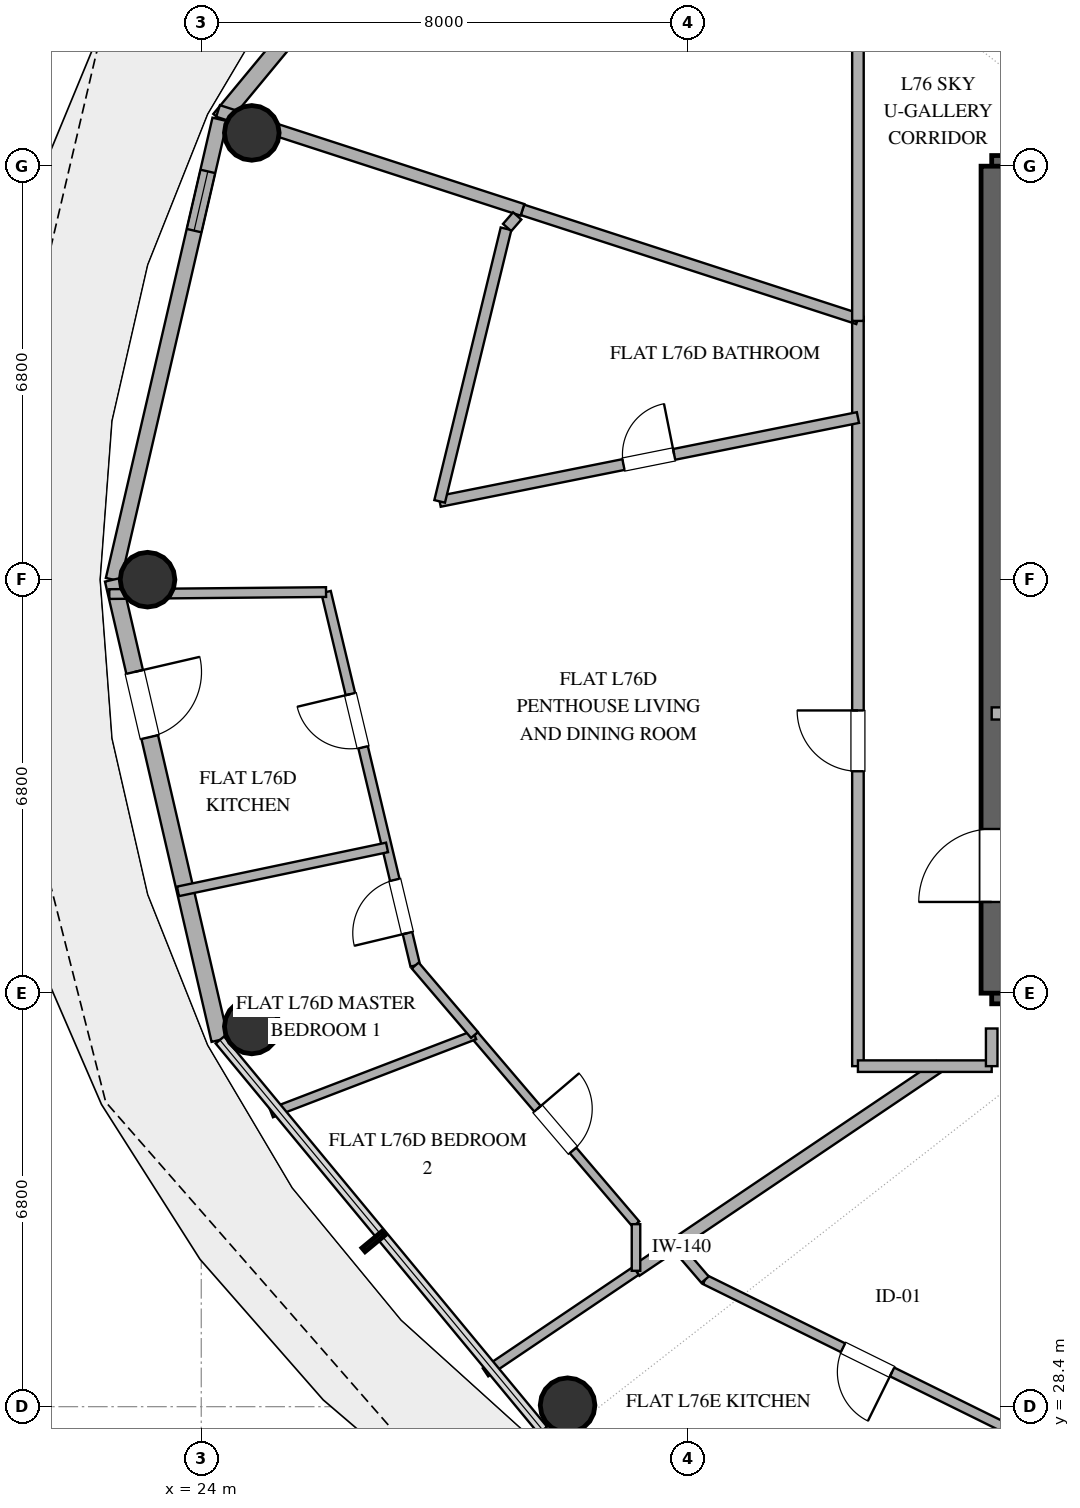
"""IFC4 building model, lengths in metres.
Left out: names, types, materials, properties, quantities, classifications, styles, units other than length and angle.
Written with IfcOpenShell. Run it as: python <this file> out.ifc"""

import sys

from ifc_helpers import new_model, si_unit, direction, frame, frame_2d, origin, origin_2d, place, context, subcontext, project, spatial, rectangle, hollow_circle, extrude, element, fill, save


model = new_model("IFC4")
c1 = context("Model", 3, precision=1e-05, world=origin(), true_north=direction((0.0, 1.0)))
c2 = subcontext(c1, "Body", "Model", "MODEL_VIEW")
j1 = project(units=[si_unit("LENGTHUNIT", "METRE"), si_unit("PLANEANGLEUNIT", "RADIAN")], contexts=[c1])
p1 = place(None, origin())
s1 = spatial("IfcSite", under=j1, at=p1, CompositionType="ELEMENT")
p2 = place(p1, origin())
s2 = spatial("IfcBuilding", under=s1, at=p2, CompositionType="ELEMENT")
p3 = place(p2, frame((0.0, 0.0, 294.6)))
s3 = spatial("IfcBuildingStorey", under=s2, at=p3, CompositionType="ELEMENT", Elevation=294.6)
for number, where, z_axis, x_axis in (
    (1, (37.0, 35.2, 0.0), (0.0, 0.0, 1.0), (1.0, 0.0, 0.0)),
    (2, (37.0, 48.8, 0.0), (0.0, 0.0, 1.0), (1.0, 0.0, 0.0)),
):
    element("IfcWall", number, at=place(p3, frame(where, z_axis=z_axis, x_axis=x_axis)), inside=s3, PredefinedType="SHEAR", context=c2, shape_type="SweptSolid", body=[
        extrude(rectangle(XDim=4.0, YDim=0.35, at=frame_2d((2.0, 0.0))), origin(), (0.0, 0.0, 1.0), 3.37),
    ])
p4 = place(p3, frame((37.0, 35.2, 0.0), z_axis=(0.0, 0.0, 1.0), x_axis=(0.0, 1.0, 0.0)))
e3 = element("IfcWall", 3, at=p4, inside=s3, PredefinedType="SHEAR", context=c2, shape_type="SweptSolid", body=[
    extrude(rectangle(XDim=13.6, YDim=0.35, at=frame_2d((6.8, 0.0))), origin(), (0.0, 0.0, 1.0), 3.37),
])
p5 = place(p4, frame((1.5, 0.0, 0.0)))
e4 = element("IfcOpeningElement", 4, at=p5, cuts=e3, PredefinedType="OPENING", context=c2, shape_type="SweptSolid", body=[
    extrude(rectangle(XDim=1.2, YDim=2.15, at=frame_2d((0.6, 1.075))), frame((0.0, 0.185, 0.0), z_axis=(0.0, -1.0, 0.0), x_axis=(1.0, 0.0, 0.0)), (0.0, 0.0, 1.0), 0.37),
])
for number, where, z_axis, x_axis in (
    (5, (24.831, 49.347, 0.0), (0.0, 0.0, 1.0), (1.0, 0.0, 0.0)),
    (6, (23.117, 42.0, 0.0), (0.0, 0.0, 1.0), (1.0, 0.0, 0.0)),
    (7, (24.831, 34.653, 0.0), (0.0, 0.0, 1.0), (1.0, 0.0, 0.0)),
    (8, (30.025, 28.424, 0.0), (0.0, 0.0, 1.0), (1.0, 0.0, 0.0)),
):
    element("IfcColumn", number, at=place(p3, frame(where, z_axis=z_axis, x_axis=x_axis)), inside=s3, PredefinedType="COLUMN", context=c2, shape_type="SweptSolid", body=[
        extrude(hollow_circle(Radius=0.45, WallThickness=0.025, at=origin_2d()), origin(), (0.0, 0.0, 1.0), 3.37),
    ])
p6 = place(p3, frame((29.617, 55.987, 0.0), z_axis=(0.0, 0.0, 1.0), x_axis=(-0.63761509934, -0.770355103243, 0.0)))
e9 = element("IfcWall", 9, at=p6, inside=s3, PredefinedType="SOLIDWALL", context=c2, shape_type="SweptSolid", body=[
    extrude(rectangle(XDim=8.33, YDim=0.28, at=frame_2d((4.165, 0.0))), origin(), (0.0, 0.0, 1.0), 3.37),
])
p7 = place(p6, frame((2.226, 0.0, 0.85)))
e10 = element("IfcOpeningElement", 10, at=p7, cuts=e9, PredefinedType="OPENING", context=c2, shape_type="SweptSolid", body=[
    extrude(rectangle(XDim=1.5, YDim=2.0, at=frame_2d((0.75, 1.0))), frame((0.0, 0.15, 0.0), z_axis=(0.0, -1.0, 0.0), x_axis=(1.0, 0.0, 0.0)), (0.0, 0.0, 1.0), 0.3),
])
p8 = place(p6, frame((4.496, 0.0, 0.85)))
e11 = element("IfcOpeningElement", 11, at=p8, cuts=e9, PredefinedType="OPENING", context=c2, shape_type="SweptSolid", body=[
    extrude(rectangle(XDim=1.5, YDim=2.0, at=frame_2d((0.75, 1.0))), frame((0.0, 0.15, 0.0), z_axis=(0.0, -1.0, 0.0), x_axis=(1.0, 0.0, 0.0)), (0.0, 0.0, 1.0), 0.3),
])
p9 = place(p3, frame((24.306, 49.57, 0.0), z_axis=(0.0, 0.0, 1.0), x_axis=(-0.225635078214, -0.974211892495, 0.0)))
e12 = element("IfcWall", 12, at=p9, inside=s3, PredefinedType="SOLIDWALL", context=c2, shape_type="SweptSolid", body=[
    extrude(rectangle(XDim=7.77, YDim=0.25, at=frame_2d((3.885, 0.0))), origin(), (0.0, 0.0, 1.0), 3.37),
])
p10 = place(p9, frame((0.878, 0.0, 1.42)))
e13 = element("IfcOpeningElement", 13, at=p10, cuts=e12, PredefinedType="OPENING", context=c2, shape_type="SweptSolid", body=[
    extrude(rectangle(XDim=1.0, YDim=1.05, at=frame_2d((0.5, 0.525))), frame((0.0, 0.135, 0.0), z_axis=(0.0, -1.0, 0.0), x_axis=(1.0, 0.0, 0.0)), (0.0, 0.0, 1.0), 0.27),
])
p11 = place(p3, frame((22.553, 42.0, 0.0), z_axis=(0.0, 0.0, 1.0), x_axis=(0.225635078214, -0.974211892495, 0.0)))
e14 = element("IfcWall", 14, at=p11, inside=s3, PredefinedType="SOLIDWALL", context=c2, shape_type="SweptSolid", body=[
    extrude(rectangle(XDim=7.77, YDim=0.28, at=frame_2d((3.885, 0.0))), origin(), (0.0, 0.0, 1.0), 3.37),
])
p12 = place(p11, frame((1.557, 0.0, 0.0)))
e15 = element("IfcOpeningElement", 15, at=p12, cuts=e14, PredefinedType="OPENING", context=c2, shape_type="SweptSolid", body=[
    extrude(rectangle(XDim=1.1, YDim=2.25, at=frame_2d((0.55, 1.125))), frame((0.0, 0.15, 0.0), z_axis=(0.0, -1.0, 0.0), x_axis=(1.0, 0.0, 0.0)), (0.0, 0.0, 1.0), 0.3),
])
p13 = place(p3, frame((29.617, 28.013, 0.0), z_axis=(0.0, 0.0, 1.0), x_axis=(0.890007394051, -0.455946091699, 0.0)))
e16 = element("IfcWall", 16, at=p13, inside=s3, PredefinedType="SOLIDWALL", context=c2, shape_type="SweptSolid", body=[
    extrude(rectangle(XDim=9.404, YDim=0.28, at=frame_2d((4.702, 0.0))), origin(), (0.0, 0.0, 1.0), 3.37),
])
p14 = place(p13, frame((2.375, 0.0, 0.85)))
e17 = element("IfcOpeningElement", 17, at=p14, cuts=e16, PredefinedType="OPENING", context=c2, shape_type="SweptSolid", body=[
    extrude(rectangle(XDim=1.2, YDim=1.6, at=frame_2d((0.6, 0.8))), frame((0.0, 0.15, 0.0), z_axis=(0.0, -1.0, 0.0), x_axis=(1.0, 0.0, 0.0)), (0.0, 0.0, 1.0), 0.3),
])
p15 = place(p13, frame((4.374, 0.0, 0.85)))
e18 = element("IfcOpeningElement", 18, at=p15, cuts=e16, PredefinedType="OPENING", context=c2, shape_type="SweptSolid", body=[
    extrude(rectangle(XDim=1.2, YDim=1.6, at=frame_2d((0.6, 0.8))), frame((0.0, 0.15, 0.0), z_axis=(0.0, -1.0, 0.0), x_axis=(1.0, 0.0, 0.0)), (0.0, 0.0, 1.0), 0.3),
])
p16 = place(p13, frame((6.915, 0.0, 0.85)))
e19 = element("IfcOpeningElement", 19, at=p16, cuts=e16, PredefinedType="OPENING", context=c2, shape_type="SweptSolid", body=[
    extrude(rectangle(XDim=1.0, YDim=1.8, at=frame_2d((0.5, 0.9))), frame((0.0, 0.15, 0.0), z_axis=(0.0, -1.0, 0.0), x_axis=(1.0, 0.0, 0.0)), (0.0, 0.0, 1.0), 0.3),
])
p17 = place(p3, frame((37.0, 39.8, 0.0), z_axis=(0.0, 0.0, 1.0), x_axis=(1.0, 0.0, 0.0)))
e20 = element("IfcWall", 20, at=p17, inside=s3, PredefinedType="SOLIDWALL", context=c2, shape_type="SweptSolid", body=[
    extrude(rectangle(XDim=4.0, YDim=0.2, at=frame_2d((2.0, 0.0))), origin(), (0.0, 0.0, 1.0), 2.73),
])
p18 = place(p17, frame((1.45, 0.0, 0.0)))
e21 = element("IfcOpeningElement", 21, at=p18, cuts=e20, PredefinedType="OPENING", context=c2, shape_type="SweptSolid", body=[
    extrude(rectangle(XDim=1.1, YDim=2.15, at=frame_2d((0.55, 1.075))), frame((0.0, 0.11, 0.0), z_axis=(0.0, -1.0, 0.0), x_axis=(1.0, 0.0, 0.0)), (0.0, 0.0, 1.0), 0.22),
])
p19 = place(p3, frame((34.8, 34.0, 0.0), z_axis=(0.0, 0.0, 1.0), x_axis=(0.0, 1.0, 0.0)))
e22 = element("IfcWall", 22, at=p19, inside=s3, PredefinedType="PARTITIONING", context=c2, shape_type="SweptSolid", body=[
    extrude(rectangle(XDim=12.323, YDim=0.19, at=frame_2d((6.161, 0.0))), origin(), (0.0, 0.0, 1.0), 2.73),
])
p20 = place(p19, frame((4.849, 0.0, 0.0)))
e23 = element("IfcOpeningElement", 23, at=p20, cuts=e22, PredefinedType="OPENING", context=c2, shape_type="SweptSolid", body=[
    extrude(rectangle(XDim=1.0, YDim=2.2, at=frame_2d((0.5, 1.1))), frame((0.0, 0.105, 0.0), z_axis=(0.0, -1.0, 0.0), x_axis=(1.0, 0.0, 0.0)), (0.0, 0.0, 1.0), 0.21),
])
p21 = place(p3, frame((27.921, 43.288, 0.0), z_axis=(0.0, 0.0, 1.0), x_axis=(0.980509676699, 0.196470796559, 0.0)))
e24 = element("IfcWall", 24, at=p21, inside=s3, PredefinedType="PLUMBINGWALL", context=c2, shape_type="SweptSolid", body=[
    extrude(rectangle(XDim=7.016, YDim=0.18, at=frame_2d((3.508, 0.0))), origin(), (0.0, 0.0, 1.0), 2.73),
])
p22 = place(p21, frame((3.083, 0.0, 0.0)))
e25 = element("IfcOpeningElement", 25, at=p22, cuts=e24, PredefinedType="OPENING", context=c2, shape_type="SweptSolid", body=[
    extrude(rectangle(XDim=0.85, YDim=2.1, at=frame_2d((0.425, 1.05))), frame((0.0, 0.1, 0.0), z_axis=(0.0, -1.0, 0.0), x_axis=(1.0, 0.0, 0.0)), (0.0, 0.0, 1.0), 0.2),
])
p23 = place(p3, frame((37.63, 27.852, 0.0), z_axis=(0.0, 0.0, 1.0), x_axis=(-0.896847493932, 0.442339883605, 0.0)))
e26 = element("IfcWall", 26, at=p23, inside=s3, PredefinedType="PLUMBINGWALL", context=c2, shape_type="SweptSolid", body=[
    extrude(rectangle(XDim=5.959, YDim=0.16, at=frame_2d((2.979, 0.0))), origin(), (0.0, 0.0, 1.0), 2.73),
])
p24 = place(p23, frame((2.53, 0.0, 0.0)))
e27 = element("IfcOpeningElement", 27, at=p24, cuts=e26, PredefinedType="OPENING", context=c2, shape_type="SweptSolid", body=[
    extrude(rectangle(XDim=0.9, YDim=2.1, at=frame_2d((0.45, 1.05))), frame((0.0, 0.09, 0.0), z_axis=(0.0, -1.0, 0.0), x_axis=(1.0, 0.0, 0.0)), (0.0, 0.0, 1.0), 0.18),
])
p25 = place(p3, frame((29.283, 48.082, 0.0), z_axis=(0.0, 0.0, 1.0), x_axis=(0.951054787399, -0.309022315318, 0.0)))
e28 = element("IfcWall", 28, at=p25, inside=s3, PredefinedType="PLUMBINGWALL", context=c2, shape_type="SweptSolid", body=[
    extrude(rectangle(XDim=5.801, YDim=0.18, at=frame_2d((2.901, 0.0))), origin(), (0.0, 0.0, 1.0), 2.73),
])
p26 = place(p3, frame((24.276, 49.708, 0.0), z_axis=(0.0, 0.0, 1.0), x_axis=(0.95105383501, -0.3090252464, 0.0)))
e29 = element("IfcWall", 29, at=p26, inside=s3, PredefinedType="PARTITIONING", context=c2, shape_type="SweptSolid", body=[
    extrude(rectangle(XDim=5.264, YDim=0.2, at=frame_2d((2.632, 0.0))), origin(), (0.0, 0.0, 1.0), 2.73),
])
p27 = place(p3, frame((31.15, 30.635, 0.0), z_axis=(0.0, 0.0, 1.0), x_axis=(0.829036266652, 0.559194839546, 0.0)))
e30 = element("IfcWall", 30, at=p27, inside=s3, PredefinedType="PARTITIONING", context=c2, shape_type="SweptSolid", body=[
    extrude(rectangle(XDim=6.019, YDim=0.2, at=frame_2d((3.009, 0.0))), origin(), (0.0, 0.0, 1.0), 2.73),
])
p28 = place(p3, frame((34.8, 46.255, 0.0), z_axis=(0.0, 0.0, 1.0), x_axis=(0.0, 1.0, 0.0)))
e31 = element("IfcWall", 31, at=p28, inside=s3, PredefinedType="PARTITIONING", context=c2, shape_type="SweptSolid", body=[
    extrude(rectangle(XDim=4.645, YDim=0.19, at=frame_2d((2.322, 0.0))), origin(), (0.0, 0.0, 1.0), 2.73),
])
p29 = place(p3, frame((29.012, 47.771, 0.0), z_axis=(0.0, 0.0, 1.0), x_axis=(-0.236555437191, -0.971617993419, 0.0)))
e32 = element("IfcWall", 32, at=p29, inside=s3, PredefinedType="PLUMBINGWALL", context=c2, shape_type="SweptSolid", body=[
    extrude(rectangle(XDim=4.614, YDim=0.18, at=frame_2d((2.307, 0.0))), origin(), (0.0, 0.0, 1.0), 2.73),
])
p30 = place(p3, frame((27.519, 35.655, 0.0), z_axis=(0.0, 0.0, 1.0), x_axis=(-0.232313993087, 0.97264084256, 0.0)))
e33 = element("IfcWall", 33, at=p30, inside=s3, PredefinedType="PLUMBINGWALL", context=c2, shape_type="SweptSolid", body=[
    extrude(rectangle(XDim=6.314, YDim=0.16, at=frame_2d((3.157, 0.0))), origin(), (0.0, 0.0, 1.0), 2.73),
])
p31 = place(p30, frame((3.689, 0.0, 0.0)))
e34 = element("IfcOpeningElement", 34, at=p31, cuts=e33, PredefinedType="OPENING", context=c2, shape_type="SweptSolid", body=[
    extrude(rectangle(XDim=0.9, YDim=2.1, at=frame_2d((0.45, 1.05))), frame((0.0, 0.09, 0.0), z_axis=(0.0, -1.0, 0.0), x_axis=(1.0, 0.0, 0.0)), (0.0, 0.0, 1.0), 0.18),
])
p32 = place(p30, frame((0.548, 0.0, 0.0)))
e35 = element("IfcOpeningElement", 35, at=p32, cuts=e33, PredefinedType="OPENING", context=c2, shape_type="SweptSolid", body=[
    extrude(rectangle(XDim=0.9, YDim=2.1, at=frame_2d((0.45, 1.05))), frame((0.0, 0.09, 0.0), z_axis=(0.0, -1.0, 0.0), x_axis=(1.0, 0.0, 0.0)), (0.0, 0.0, 1.0), 0.18),
])
p33 = place(p3, frame((28.494, 34.512, 0.0), z_axis=(0.0, 0.0, 1.0), x_axis=(0.649192484668, -0.760624163336, 0.0)))
e36 = element("IfcWall", 36, at=p33, inside=s3, PredefinedType="PARTITIONING", context=c2, shape_type="SweptSolid", body=[
    extrude(rectangle(XDim=4.091, YDim=0.14, at=frame_2d((2.045, 0.0))), origin(), (0.0, 0.0, 1.0), 2.73),
])
p34 = place(p33, frame((1.595, 0.0, 0.0)))
e37 = element("IfcOpeningElement", 37, at=p34, cuts=e36, PredefinedType="OPENING", context=c2, shape_type="SweptSolid", body=[
    extrude(rectangle(XDim=0.9, YDim=2.1, at=frame_2d((0.45, 1.05))), frame((0.0, 0.08, 0.0), z_axis=(0.0, -1.0, 0.0), x_axis=(1.0, 0.0, 0.0)), (0.0, 0.0, 1.0), 0.16),
])
p35 = place(p3, frame((28.494, 34.512, 0.0), z_axis=(0.0, 0.0, 1.0), x_axis=(-0.933587977353, -0.358348278274, 0.0)))
e38 = element("IfcWall", 38, at=p35, inside=s3, PredefinedType="PARTITIONING", context=c2, shape_type="SweptSolid", body=[
    extrude(rectangle(XDim=3.58, YDim=0.15, at=frame_2d((1.79, 0.0))), origin(), (0.0, 0.0, 1.0), 2.73),
])
p36 = place(p3, frame((26.052, 41.796, 0.0), z_axis=(0.0, 0.0, 1.0), x_axis=(-0.999957259018, -0.009245546878, 0.0)))
e39 = element("IfcWall", 39, at=p36, inside=s3, PredefinedType="PLUMBINGWALL", context=c2, shape_type="SweptSolid", body=[
    extrude(rectangle(XDim=3.565, YDim=0.16, at=frame_2d((1.782, 0.0))), origin(), (0.0, 0.0, 1.0), 2.73),
])
p37 = place(p3, frame((27.055, 37.597, 0.0), z_axis=(0.0, 0.0, 1.0), x_axis=(-0.978617562331, -0.205688275545, 0.0)))
e40 = element("IfcWall", 40, at=p37, inside=s3, PredefinedType="PLUMBINGWALL", context=c2, shape_type="SweptSolid", body=[
    extrude(rectangle(XDim=3.513, YDim=0.16, at=frame_2d((1.757, 0.0))), origin(), (0.0, 0.0, 1.0), 2.73),
])
p38 = place(p3, frame((31.15, 30.635, 0.0), z_axis=(0.0, 0.0, 1.0), x_axis=(-0.82904391661, -0.559183497907, 0.0)))
e41 = element("IfcWall", 41, at=p38, inside=s3, PredefinedType="PLUMBINGWALL", context=c2, shape_type="SweptSolid", body=[
    extrude(rectangle(XDim=2.986, YDim=0.16, at=frame_2d((1.493, 0.0))), origin(), (0.0, 0.0, 1.0), 2.73),
])
p39 = place(p3, frame((27.519, 35.655, 0.0), z_axis=(0.0, 0.0, 1.0), x_axis=(0.649250915383, -0.760574288859, 0.0)))
e42 = element("IfcWall", 42, at=p39, inside=s3, PredefinedType="PARTITIONING", context=c2, shape_type="SweptSolid", body=[
    extrude(rectangle(XDim=1.502, YDim=0.15, at=frame_2d((0.751, 0.0))), origin(), (0.0, 0.0, 1.0), 2.73),
])
p40 = place(p3, frame((37.0, 34.0, 0.0), z_axis=(0.0, 0.0, 1.0), x_axis=(-1.0, 0.0, 0.0)))
e43 = element("IfcWall", 43, at=p40, inside=s3, PredefinedType="PARTITIONING", context=c2, shape_type="SweptSolid", body=[
    extrude(rectangle(XDim=2.2, YDim=0.19, at=frame_2d((1.1, 0.0))), origin(), (0.0, 0.0, 1.0), 2.73),
])
p41 = place(p3, frame((31.15, 31.401, 0.0), z_axis=(0.0, 0.0, 1.0), x_axis=(0.0, -1.0, 0.0)))
e44 = element("IfcWall", 44, at=p41, inside=s3, PredefinedType="PARTITIONING", context=c2, shape_type="SweptSolid", body=[
    extrude(rectangle(XDim=0.767, YDim=0.14, at=frame_2d((0.383, 0.0))), origin(), (0.0, 0.0, 1.0), 2.73),
])
p42 = place(p3, frame((32.286, 30.488, 0.0), z_axis=(0.0, 0.0, 1.0), x_axis=(-0.651714881855, 0.758464048435, 0.0)))
e45 = element("IfcWall", 45, at=p42, inside=s3, PredefinedType="PLUMBINGWALL", context=c2, shape_type="SweptSolid", body=[
    extrude(rectangle(XDim=0.761, YDim=0.16, at=frame_2d((0.381, 0.0))), origin(), (0.0, 0.0, 1.0), 2.73),
])
p43 = place(p3, frame((37.0, 34.619, 0.0), z_axis=(0.0, 0.0, 1.0), x_axis=(0.0, -1.0, 0.0)))
e46 = element("IfcWall", 46, at=p43, inside=s3, PredefinedType="PARTITIONING", context=c2, shape_type="SweptSolid", body=[
    extrude(rectangle(XDim=0.619, YDim=0.19, at=frame_2d((0.31, 0.0))), origin(), (0.0, 0.0, 1.0), 2.73),
])
p44 = place(p3, frame((29.196, 47.982, 0.0), z_axis=(0.0, 0.0, 1.0), x_axis=(-0.656442741053, -0.754375853086, 0.0)))
e47 = element("IfcWall", 47, at=p44, inside=s3, PredefinedType="PLUMBINGWALL", context=c2, shape_type="SweptSolid", body=[
    extrude(rectangle(XDim=0.252, YDim=0.18, at=frame_2d((0.126, 0.0))), origin(), (0.0, 0.0, 1.0), 2.73),
])
p45 = place(p12, origin())
e48 = element("IfcDoor", 48, at=p45, inside=s3, OperationType="SINGLE_SWING_LEFT", PredefinedType="DOOR", context=c2, shape_type="SweptSolid", body=[
    extrude(rectangle(XDim=1.1, YDim=2.25, at=frame_2d((0.55, 1.125))), frame((0.0, 0.025, 0.0), z_axis=(0.0, -1.0, 0.0), x_axis=(1.0, 0.0, 0.0)), (0.0, 0.0, 1.0), 0.05),
])
fill(e15, e48)
p46 = place(p10, origin())
e49 = element("IfcWindow", 49, at=p46, inside=s3, PartitioningType="SINGLE_PANEL", PredefinedType="WINDOW", context=c2, shape_type="SweptSolid", body=[
    extrude(rectangle(XDim=1.0, YDim=1.05, at=frame_2d((0.5, 0.525))), frame((0.0, 0.03, 0.0), z_axis=(0.0, -1.0, 0.0), x_axis=(1.0, 0.0, 0.0)), (0.0, 0.0, 1.0), 0.06),
])
fill(e13, e49)
p47 = place(p5, origin())
e50 = element("IfcDoor", 50, at=p47, inside=s3, OperationType="SINGLE_SWING_LEFT", PredefinedType="DOOR", context=c2, shape_type="SweptSolid", body=[
    extrude(rectangle(XDim=1.2, YDim=2.15, at=frame_2d((0.6, 1.075))), frame((0.0, 0.025, 0.0), z_axis=(0.0, -1.0, 0.0), x_axis=(1.0, 0.0, 0.0)), (0.0, 0.0, 1.0), 0.05),
])
fill(e4, e50)
p48 = place(p20, origin())
e51 = element("IfcDoor", 51, at=p48, inside=s3, OperationType="SINGLE_SWING_RIGHT", PredefinedType="DOOR", context=c2, shape_type="SweptSolid", body=[
    extrude(rectangle(XDim=1.0, YDim=2.2, at=frame_2d((0.5, 1.1))), frame((0.0, 0.025, 0.0), z_axis=(0.0, -1.0, 0.0), x_axis=(1.0, 0.0, 0.0)), (0.0, 0.0, 1.0), 0.05),
])
fill(e23, e51)
p49 = place(p22, origin())
e52 = element("IfcDoor", 52, at=p49, inside=s3, OperationType="SINGLE_SWING_RIGHT", PredefinedType="DOOR", context=c2, shape_type="SweptSolid", body=[
    extrude(rectangle(XDim=0.85, YDim=2.1, at=frame_2d((0.425, 1.05))), frame((0.0, 0.025, 0.0), z_axis=(0.0, -1.0, 0.0), x_axis=(1.0, 0.0, 0.0)), (0.0, 0.0, 1.0), 0.05),
])
fill(e25, e52)
p50 = place(p24, origin())
e53 = element("IfcDoor", 53, at=p50, inside=s3, OperationType="SINGLE_SWING_LEFT", PredefinedType="DOOR", context=c2, shape_type="SweptSolid", body=[
    extrude(rectangle(XDim=0.9, YDim=2.1, at=frame_2d((0.45, 1.05))), frame((0.0, 0.025, 0.0), z_axis=(0.0, -1.0, 0.0), x_axis=(1.0, 0.0, 0.0)), (0.0, 0.0, 1.0), 0.05),
])
fill(e27, e53)
p51 = place(p31, origin())
e54 = element("IfcDoor", 54, at=p51, inside=s3, OperationType="SINGLE_SWING_RIGHT", PredefinedType="DOOR", context=c2, shape_type="SweptSolid", body=[
    extrude(rectangle(XDim=0.9, YDim=2.1, at=frame_2d((0.45, 1.05))), frame((0.0, 0.025, 0.0), z_axis=(0.0, -1.0, 0.0), x_axis=(1.0, 0.0, 0.0)), (0.0, 0.0, 1.0), 0.05),
])
fill(e34, e54)
p52 = place(p32, origin())
e55 = element("IfcDoor", 55, at=p52, inside=s3, OperationType="SINGLE_SWING_LEFT", PredefinedType="DOOR", context=c2, shape_type="SweptSolid", body=[
    extrude(rectangle(XDim=0.9, YDim=2.1, at=frame_2d((0.45, 1.05))), frame((0.0, 0.025, 0.0), z_axis=(0.0, -1.0, 0.0), x_axis=(1.0, 0.0, 0.0)), (0.0, 0.0, 1.0), 0.05),
])
fill(e35, e55)
p53 = place(p34, origin())
e56 = element("IfcDoor", 56, at=p53, inside=s3, OperationType="SINGLE_SWING_LEFT", PredefinedType="DOOR", context=c2, shape_type="SweptSolid", body=[
    extrude(rectangle(XDim=0.9, YDim=2.1, at=frame_2d((0.45, 1.05))), frame((0.0, 0.025, 0.0), z_axis=(0.0, -1.0, 0.0), x_axis=(1.0, 0.0, 0.0)), (0.0, 0.0, 1.0), 0.05),
])
fill(e37, e56)
save(model, sys.argv[1])
